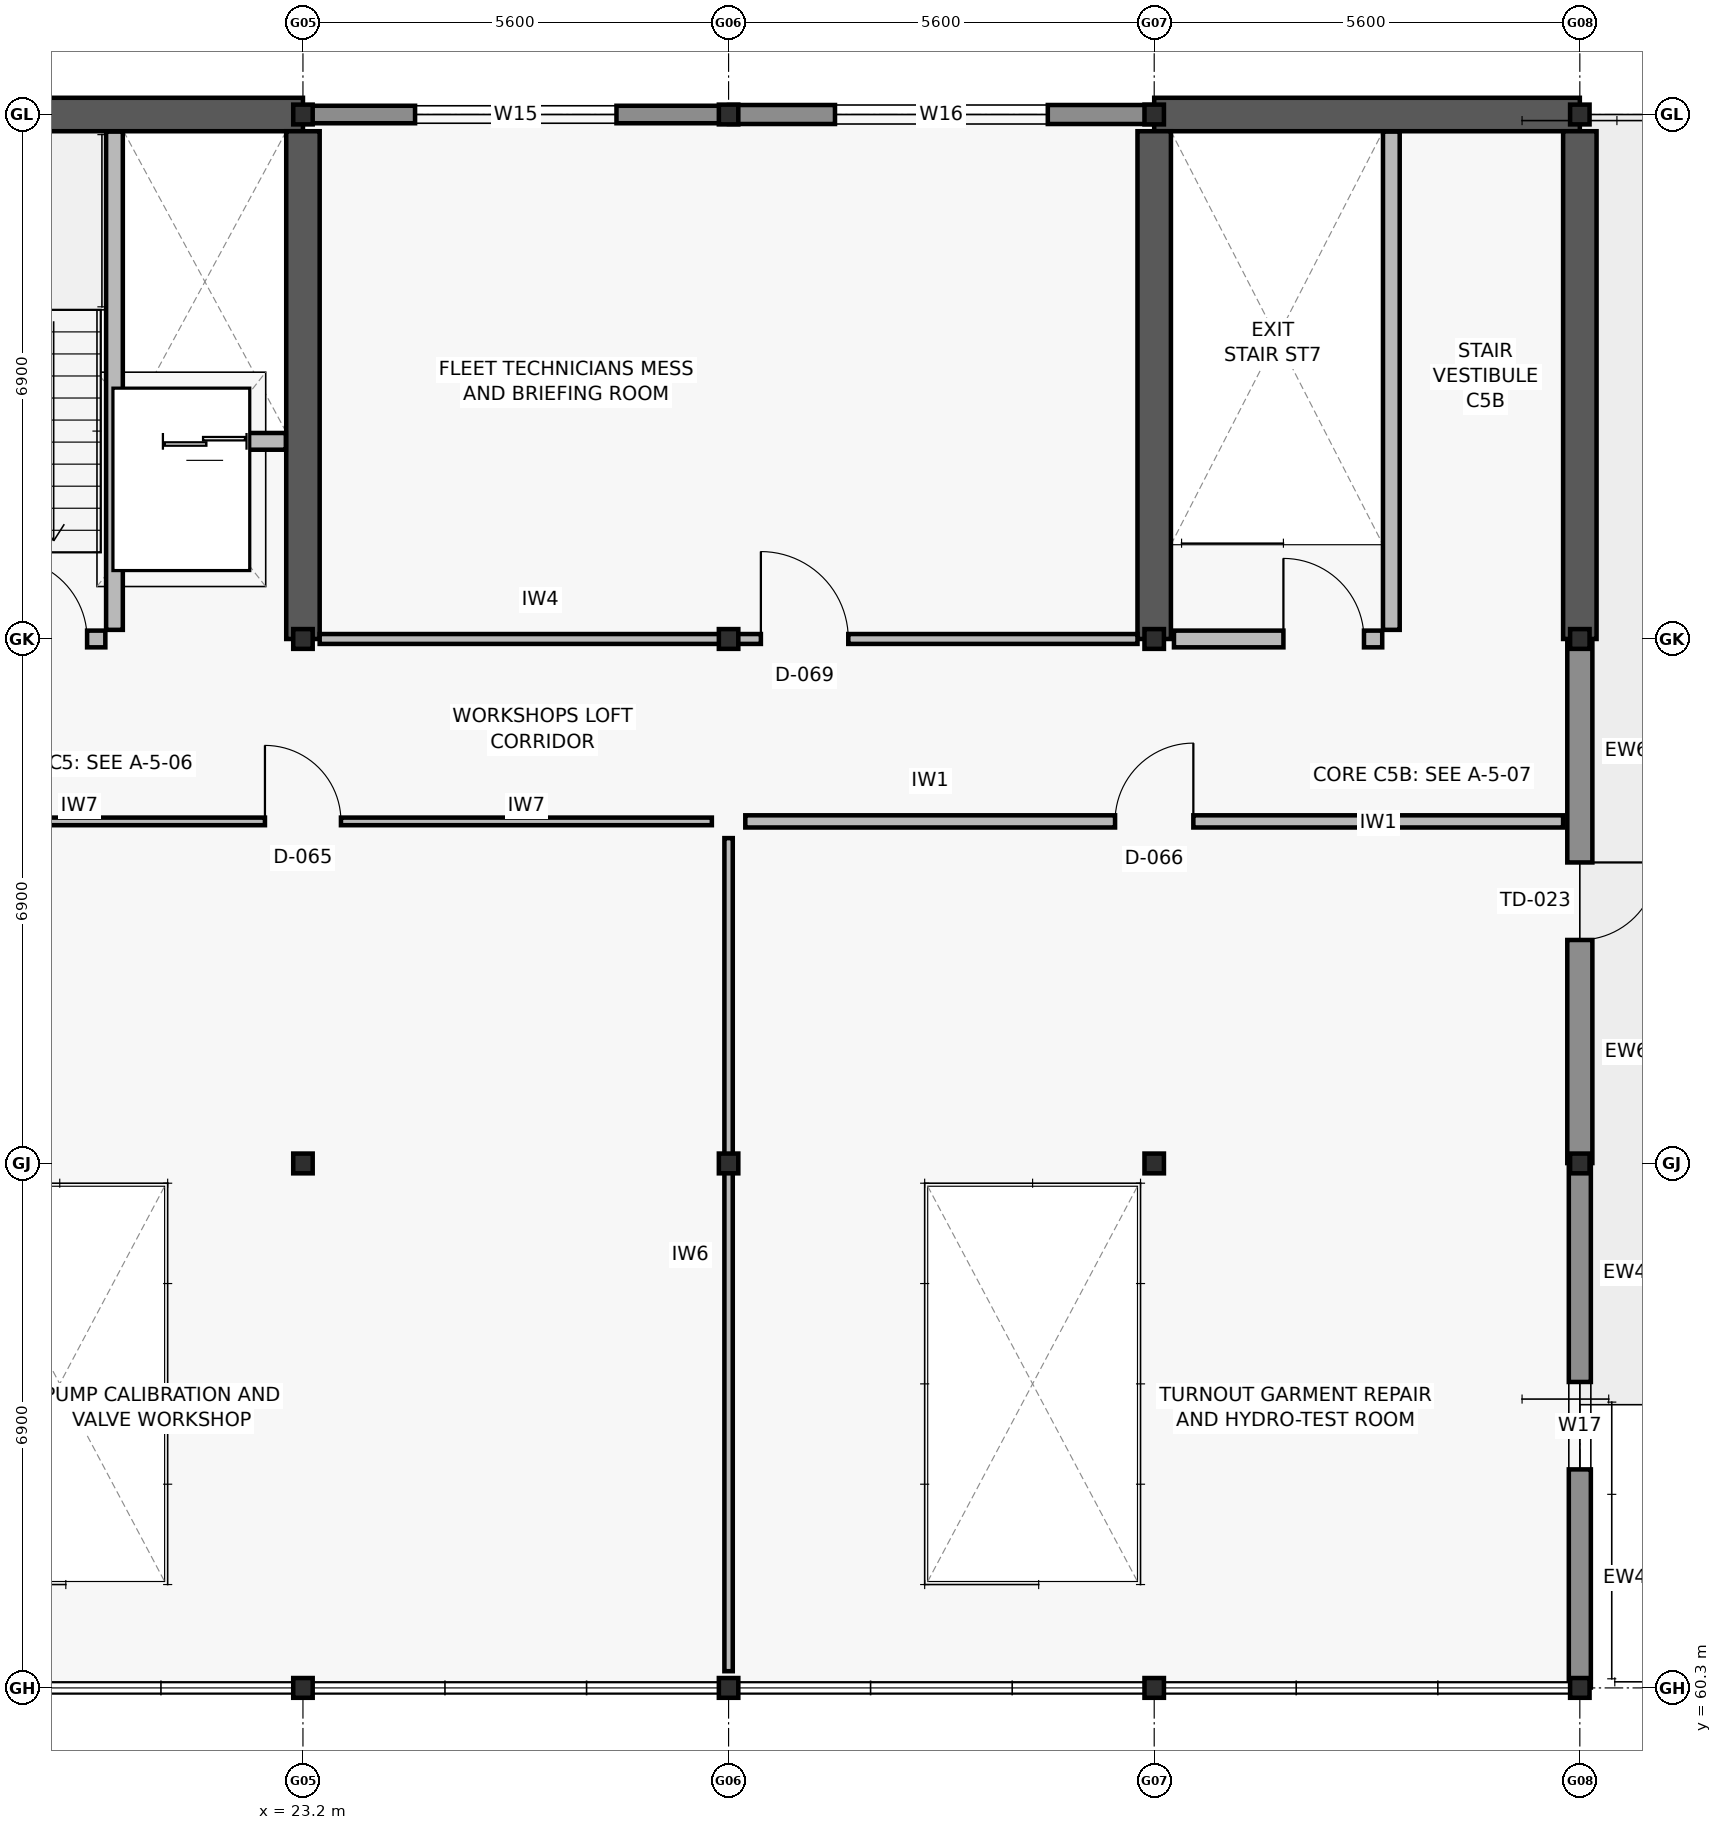
"""IFC4 building model, lengths in metres.
Left out: names, types, materials, properties, quantities, classifications, styles, units other than length and angle.
Written with IfcOpenShell. Run it as: python <this file> out.ifc"""

import sys

from ifc_helpers import new_model, si_unit, direction, frame, frame_2d, origin, origin_2d, place, context, subcontext, project, spatial, rectangle, i_section, extrude, element, fill, save


model = new_model("IFC4")
c1 = context("Model", 3, precision=1e-05, world=origin(), true_north=direction((0.0, 1.0)))
c2 = subcontext(c1, "Body", "Model", "MODEL_VIEW")
j1 = project(units=[si_unit("LENGTHUNIT", "METRE"), si_unit("PLANEANGLEUNIT", "RADIAN")], contexts=[c1])
p1 = place(None, origin())
s1 = spatial("IfcSite", under=j1, at=p1, CompositionType="ELEMENT")
p2 = place(p1, origin())
s2 = spatial("IfcBuilding", under=s1, at=p2, CompositionType="ELEMENT")
p3 = place(p2, frame((0.0, 0.0, 5.4)))
s3 = spatial("IfcBuildingStorey", under=s2, at=p3, CompositionType="ELEMENT", Elevation=5.4)
for number, where, z_axis, x_axis in (
    (1, (23.2, 60.3, 0.0), (0.0, 0.0, 1.0), (1.0, 0.0, 0.0)),
    (2, (23.2, 67.2, 0.0), (0.0, 0.0, 1.0), (1.0, 0.0, 0.0)),
    (3, (23.2, 74.1, 0.0), (0.0, 0.0, 1.0), (1.0, 0.0, 0.0)),
    (4, (23.2, 81.0, 0.0), (0.0, 0.0, 1.0), (1.0, 0.0, 0.0)),
    (5, (28.8, 60.3, 0.0), (0.0, 0.0, 1.0), (1.0, 0.0, 0.0)),
    (6, (28.8, 67.2, 0.0), (0.0, 0.0, 1.0), (1.0, 0.0, 0.0)),
    (7, (28.8, 74.1, 0.0), (0.0, 0.0, 1.0), (1.0, 0.0, 0.0)),
    (8, (28.8, 81.0, 0.0), (0.0, 0.0, 1.0), (1.0, 0.0, 0.0)),
    (9, (34.4, 60.3, 0.0), (0.0, 0.0, 1.0), (1.0, 0.0, 0.0)),
    (10, (34.4, 67.2, 0.0), (0.0, 0.0, 1.0), (1.0, 0.0, 0.0)),
    (11, (34.4, 74.1, 0.0), (0.0, 0.0, 1.0), (1.0, 0.0, 0.0)),
    (12, (34.4, 81.0, 0.0), (0.0, 0.0, 1.0), (1.0, 0.0, 0.0)),
    (13, (40.0, 60.3, 0.0), (0.0, 0.0, 1.0), (1.0, 0.0, 0.0)),
    (14, (40.0, 67.2, 0.0), (0.0, 0.0, 1.0), (1.0, 0.0, 0.0)),
    (15, (40.0, 74.1, 0.0), (0.0, 0.0, 1.0), (1.0, 0.0, 0.0)),
    (16, (40.0, 81.0, 0.0), (0.0, 0.0, 1.0), (1.0, 0.0, 0.0)),
):
    element("IfcColumn", number, at=place(p3, frame(where, z_axis=z_axis, x_axis=x_axis)), inside=s3, PredefinedType="COLUMN", context=c2, shape_type="SweptSolid", body=[
        extrude(i_section(OverallWidth=0.256, OverallDepth=0.26, WebThickness=0.01, FlangeThickness=0.017, FilletRadius=0.013, at=origin_2d()), origin(), (0.0, 0.0, 1.0), 4.2),
    ])
p4 = place(p3, frame((17.6, 81.0, 0.0), z_axis=(0.0, 0.0, 1.0), x_axis=(1.0, 0.0, 0.0)))
e17 = element("IfcWall", 17, at=p4, inside=s3, PredefinedType="SHEAR", context=c2, shape_type="SweptSolid", body=[
    extrude(rectangle(XDim=5.6, YDim=0.44, at=frame_2d((2.8, 0.0))), origin(), (0.0, 0.0, 1.0), 3.96),
])
p5 = place(p3, frame((23.2, 74.1, 0.0), z_axis=(0.0, 0.0, 1.0), x_axis=(0.0, 1.0, 0.0)))
e18 = element("IfcWall", 18, at=p5, inside=s3, PredefinedType="SHEAR", context=c2, shape_type="SweptSolid", body=[
    extrude(rectangle(XDim=6.68, YDim=0.44, at=frame_2d((3.34, 0.0))), origin(), (0.0, 0.0, 1.0), 3.96),
])
p6 = place(p3, frame((34.4, 81.0, 0.0), z_axis=(0.0, 0.0, 1.0), x_axis=(1.0, 0.0, 0.0)))
e19 = element("IfcWall", 19, at=p6, inside=s3, PredefinedType="SHEAR", context=c2, shape_type="SweptSolid", body=[
    extrude(rectangle(XDim=5.6, YDim=0.44, at=frame_2d((2.8, 0.0))), origin(), (0.0, 0.0, 1.0), 3.96),
])
for number, where, z_axis, x_axis in (
    (20, (34.4, 74.1, 0.0), (0.0, 0.0, 1.0), (0.0, 1.0, 0.0)),
    (21, (40.0, 74.1, 0.0), (0.0, 0.0, 1.0), (0.0, 1.0, 0.0)),
):
    element("IfcWall", number, at=place(p3, frame(where, z_axis=z_axis, x_axis=x_axis)), inside=s3, PredefinedType="SHEAR", context=c2, shape_type="SweptSolid", body=[
        extrude(rectangle(XDim=6.68, YDim=0.44, at=frame_2d((3.34, 0.0))), origin(), (0.0, 0.0, 1.0), 3.96),
    ])
p7 = place(p3, frame((23.205, 81.0, 0.0), z_axis=(0.0, 0.0, 1.0), x_axis=(1.0, 0.0, 0.0)))
e22 = element("IfcWall", 22, at=p7, inside=s3, PredefinedType="SOLIDWALL", context=c2, shape_type="SweptSolid", body=[
    extrude(rectangle(XDim=5.59, YDim=0.23, at=frame_2d((2.795, 0.0))), origin(), (0.0, 0.0, 1.0), 3.32),
])
p8 = place(p7, frame((1.47, 0.0, 0.8)))
e23 = element("IfcOpeningElement", 23, at=p8, cuts=e22, PredefinedType="OPENING", context=c2, shape_type="SweptSolid", body=[
    extrude(rectangle(XDim=2.65, YDim=1.8, at=frame_2d((1.325, 0.9))), frame((0.0, 0.125, 0.0), z_axis=(0.0, -1.0, 0.0), x_axis=(1.0, 0.0, 0.0)), (0.0, 0.0, 1.0), 0.25),
])
p9 = place(p3, frame((28.805, 81.0, 0.0), z_axis=(0.0, 0.0, 1.0), x_axis=(1.0, 0.0, 0.0)))
e24 = element("IfcWall", 24, at=p9, inside=s3, PredefinedType="SOLIDWALL", context=c2, shape_type="SweptSolid", body=[
    extrude(rectangle(XDim=5.59, YDim=0.25, at=frame_2d((2.795, 0.0))), origin(), (0.0, 0.0, 1.0), 3.32),
])
p10 = place(p9, frame((1.395, 0.0, 0.8)))
e25 = element("IfcOpeningElement", 25, at=p10, cuts=e24, PredefinedType="OPENING", context=c2, shape_type="SweptSolid", body=[
    extrude(rectangle(XDim=2.8, YDim=1.8, at=frame_2d((1.4, 0.9))), frame((0.0, 0.135, 0.0), z_axis=(0.0, -1.0, 0.0), x_axis=(1.0, 0.0, 0.0)), (0.0, 0.0, 1.0), 0.27),
])
p11 = place(p3, frame((40.0, 67.195, 0.0), z_axis=(0.0, 0.0, 1.0), x_axis=(0.0, -1.0, 0.0)))
e26 = element("IfcWall", 26, at=p11, inside=s3, PredefinedType="SOLIDWALL", context=c2, shape_type="SweptSolid", body=[
    extrude(rectangle(XDim=6.89, YDim=0.29, at=frame_2d((3.445, 0.0))), origin(), (0.0, 0.0, 1.0), 3.32),
])
p12 = place(p11, frame((2.87, 0.0, 0.8)))
e27 = element("IfcOpeningElement", 27, at=p12, cuts=e26, PredefinedType="OPENING", context=c2, shape_type="SweptSolid", body=[
    extrude(rectangle(XDim=1.15, YDim=1.8, at=frame_2d((0.575, 0.9))), frame((0.0, 0.155, 0.0), z_axis=(0.0, -1.0, 0.0), x_axis=(1.0, 0.0, 0.0)), (0.0, 0.0, 1.0), 0.31),
])
p13 = place(p3, frame((40.0, 74.095, 0.0), z_axis=(0.0, 0.0, 1.0), x_axis=(0.0, -1.0, 0.0)))
e28 = element("IfcWall", 28, at=p13, inside=s3, PredefinedType="SOLIDWALL", context=c2, shape_type="SweptSolid", body=[
    extrude(rectangle(XDim=6.89, YDim=0.33, at=frame_2d((3.445, 0.0))), origin(), (0.0, 0.0, 1.0), 3.32),
])
p14 = place(p13, frame((2.935, 0.0, 0.0)))
e29 = element("IfcOpeningElement", 29, at=p14, cuts=e28, PredefinedType="OPENING", context=c2, shape_type="SweptSolid", body=[
    extrude(rectangle(XDim=1.02, YDim=2.14, at=frame_2d((0.51, 1.07))), frame((0.0, 0.175, 0.0), z_axis=(0.0, -1.0, 0.0), x_axis=(1.0, 0.0, 0.0)), (0.0, 0.0, 1.0), 0.35),
])
p15 = place(p3, frame((20.72, 74.22, 0.0), z_axis=(0.0, 0.0, 1.0), x_axis=(0.0, 1.0, 0.0)))
e30 = element("IfcWall", 30, at=p15, inside=s3, PredefinedType="SOLIDWALL", context=c2, shape_type="SweptSolid", body=[
    extrude(rectangle(XDim=6.555, YDim=0.22, at=frame_2d((3.277, 0.0))), origin(), (0.0, 0.0, 1.0), 3.96),
])
p16 = place(p3, frame((17.86, 74.1, 0.0), z_axis=(0.0, 0.0, 1.0), x_axis=(1.0, 0.0, 0.0)))
e31 = element("IfcWall", 31, at=p16, inside=s3, PredefinedType="SOLIDWALL", context=c2, shape_type="SweptSolid", body=[
    extrude(rectangle(XDim=2.74, YDim=0.22, at=frame_2d((1.37, 0.0))), origin(), (0.0, 0.0, 1.0), 3.32),
])
p17 = place(p16, frame((1.44, 0.0, 0.0)))
e32 = element("IfcOpeningElement", 32, at=p17, cuts=e31, PredefinedType="OPENING", context=c2, shape_type="SweptSolid", body=[
    extrude(rectangle(XDim=1.06, YDim=2.1, at=frame_2d((0.53, 1.05))), frame((0.0, 0.12, 0.0), z_axis=(0.0, -1.0, 0.0), x_axis=(1.0, 0.0, 0.0)), (0.0, 0.0, 1.0), 0.24),
])
p18 = place(p3, frame((20.84, 76.7, 0.0), z_axis=(0.0, 0.0, 1.0), x_axis=(1.0, 0.0, 0.0)))
e33 = element("IfcWall", 33, at=p18, inside=s3, PredefinedType="SOLIDWALL", context=c2, shape_type="SweptSolid", body=[
    extrude(rectangle(XDim=2.135, YDim=0.22, at=frame_2d((1.067, 0.0))), origin(), (0.0, 0.0, 1.0), 3.96),
])
p19 = place(p18, frame((0.518, 0.0, 0.0)))
e34 = element("IfcOpeningElement", 34, at=p19, cuts=e33, PredefinedType="OPENING", context=c2, shape_type="SweptSolid", body=[
    extrude(rectangle(XDim=1.1, YDim=2.1, at=frame_2d((0.55, 1.05))), frame((0.0, 0.12, 0.0), z_axis=(0.0, -1.0, 0.0), x_axis=(1.0, 0.0, 0.0)), (0.0, 0.0, 1.0), 0.24),
])
p20 = place(p3, frame((37.52, 74.22, 0.0), z_axis=(0.0, 0.0, 1.0), x_axis=(0.0, 1.0, 0.0)))
e35 = element("IfcWall", 35, at=p20, inside=s3, PredefinedType="SOLIDWALL", context=c2, shape_type="SweptSolid", body=[
    extrude(rectangle(XDim=6.555, YDim=0.22, at=frame_2d((3.277, 0.0))), origin(), (0.0, 0.0, 1.0), 3.96),
])
p21 = place(p3, frame((34.66, 74.1, 0.0), z_axis=(0.0, 0.0, 1.0), x_axis=(1.0, 0.0, 0.0)))
e36 = element("IfcWall", 36, at=p21, inside=s3, PredefinedType="SOLIDWALL", context=c2, shape_type="SweptSolid", body=[
    extrude(rectangle(XDim=2.74, YDim=0.22, at=frame_2d((1.37, 0.0))), origin(), (0.0, 0.0, 1.0), 3.32),
])
p22 = place(p21, frame((1.44, 0.0, 0.0)))
e37 = element("IfcOpeningElement", 37, at=p22, cuts=e36, PredefinedType="OPENING", context=c2, shape_type="SweptSolid", body=[
    extrude(rectangle(XDim=1.06, YDim=2.1, at=frame_2d((0.53, 1.05))), frame((0.0, 0.12, 0.0), z_axis=(0.0, -1.0, 0.0), x_axis=(1.0, 0.0, 0.0)), (0.0, 0.0, 1.0), 0.24),
])
p23 = place(p3, frame((28.8, 60.52, 0.0), z_axis=(0.0, 0.0, 1.0), x_axis=(0.0, 1.0, 0.0)))
e38 = element("IfcWall", 38, at=p23, inside=s3, PredefinedType="PARTITIONING", context=c2, shape_type="SweptSolid", body=[
    extrude(rectangle(XDim=10.96, YDim=0.11, at=frame_2d((5.48, 0.0))), origin(), (0.0, 0.0, 1.0), 3.3),
])
p24 = place(p3, frame((17.82, 71.7, 0.0), z_axis=(0.0, 0.0, 1.0), x_axis=(1.0, 0.0, 0.0)))
e39 = element("IfcWall", 39, at=p24, inside=s3, PredefinedType="PARTITIONING", context=c2, shape_type="SweptSolid", body=[
    extrude(rectangle(XDim=10.76, YDim=0.1, at=frame_2d((5.38, 0.0))), origin(), (0.0, 0.0, 1.0), 3.3),
])
p25 = place(p24, frame((4.88, 0.0, 0.0)))
e40 = element("IfcOpeningElement", 40, at=p25, cuts=e39, PredefinedType="OPENING", context=c2, shape_type="SweptSolid", body=[
    extrude(rectangle(XDim=1.0, YDim=2.12, at=frame_2d((0.5, 1.06))), frame((0.0, 0.06, 0.0), z_axis=(0.0, -1.0, 0.0), x_axis=(1.0, 0.0, 0.0)), (0.0, 0.0, 1.0), 0.12),
])
p26 = place(p3, frame((29.02, 71.7, 0.0), z_axis=(0.0, 0.0, 1.0), x_axis=(1.0, 0.0, 0.0)))
e41 = element("IfcWall", 41, at=p26, inside=s3, PredefinedType="PARTITIONING", context=c2, shape_type="SweptSolid", body=[
    extrude(rectangle(XDim=10.76, YDim=0.16, at=frame_2d((5.38, 0.0))), origin(), (0.0, 0.0, 1.0), 3.3),
])
p27 = place(p26, frame((4.865, 0.0, 0.0)))
e42 = element("IfcOpeningElement", 42, at=p27, cuts=e41, PredefinedType="OPENING", context=c2, shape_type="SweptSolid", body=[
    extrude(rectangle(XDim=1.03, YDim=2.06, at=frame_2d((0.515, 1.03))), frame((0.0, 0.09, 0.0), z_axis=(0.0, -1.0, 0.0), x_axis=(1.0, 0.0, 0.0)), (0.0, 0.0, 1.0), 0.18),
])
p28 = place(p3, frame((23.42, 74.1, 0.0), z_axis=(0.0, 0.0, 1.0), x_axis=(1.0, 0.0, 0.0)))
e43 = element("IfcWall", 43, at=p28, inside=s3, PredefinedType="PARTITIONING", context=c2, shape_type="SweptSolid", body=[
    extrude(rectangle(XDim=10.76, YDim=0.13, at=frame_2d((5.38, 0.0))), origin(), (0.0, 0.0, 1.0), 3.3),
])
p29 = place(p28, frame((5.805, 0.0, 0.0)))
e44 = element("IfcOpeningElement", 44, at=p29, cuts=e43, PredefinedType="OPENING", context=c2, shape_type="SweptSolid", body=[
    extrude(rectangle(XDim=1.15, YDim=2.12, at=frame_2d((0.575, 1.06))), frame((0.0, 0.075, 0.0), z_axis=(0.0, -1.0, 0.0), x_axis=(1.0, 0.0, 0.0)), (0.0, 0.0, 1.0), 0.15),
])
p30 = place(p8, origin())
e45 = element("IfcWindow", 45, at=p30, inside=s3, PartitioningType="TRIPLE_PANEL_VERTICAL", PredefinedType="WINDOW", context=c2, shape_type="SweptSolid", body=[
    extrude(rectangle(XDim=2.65, YDim=1.8, at=frame_2d((1.325, 0.9))), frame((0.0, 0.03, 0.0), z_axis=(0.0, -1.0, 0.0), x_axis=(1.0, 0.0, 0.0)), (0.0, 0.0, 1.0), 0.06),
])
fill(e23, e45)
p31 = place(p10, origin())
e46 = element("IfcWindow", 46, at=p31, inside=s3, PartitioningType="TRIPLE_PANEL_VERTICAL", PredefinedType="WINDOW", context=c2, shape_type="SweptSolid", body=[
    extrude(rectangle(XDim=2.8, YDim=1.8, at=frame_2d((1.4, 0.9))), frame((0.0, 0.03, 0.0), z_axis=(0.0, -1.0, 0.0), x_axis=(1.0, 0.0, 0.0)), (0.0, 0.0, 1.0), 0.06),
])
fill(e25, e46)
p32 = place(p12, origin())
e47 = element("IfcWindow", 47, at=p32, inside=s3, PartitioningType="SINGLE_PANEL", PredefinedType="WINDOW", context=c2, shape_type="SweptSolid", body=[
    extrude(rectangle(XDim=1.15, YDim=1.8, at=frame_2d((0.575, 0.9))), frame((0.0, 0.03, 0.0), z_axis=(0.0, -1.0, 0.0), x_axis=(1.0, 0.0, 0.0)), (0.0, 0.0, 1.0), 0.06),
])
fill(e27, e47)
p33 = place(p14, origin())
e48 = element("IfcDoor", 48, at=p33, inside=s3, OperationType="SINGLE_SWING_LEFT", PredefinedType="DOOR", context=c2, shape_type="SweptSolid", body=[
    extrude(rectangle(XDim=1.02, YDim=2.14, at=frame_2d((0.51, 1.07))), frame((0.0, 0.025, 0.0), z_axis=(0.0, -1.0, 0.0), x_axis=(1.0, 0.0, 0.0)), (0.0, 0.0, 1.0), 0.05),
])
fill(e29, e48)
p34 = place(p17, origin())
e49 = element("IfcDoor", 49, at=p34, inside=s3, OperationType="SINGLE_SWING_LEFT", PredefinedType="DOOR", context=c2, shape_type="SweptSolid", body=[
    extrude(rectangle(XDim=1.06, YDim=2.1, at=frame_2d((0.53, 1.05))), frame((0.0, 0.025, 0.0), z_axis=(0.0, -1.0, 0.0), x_axis=(1.0, 0.0, 0.0)), (0.0, 0.0, 1.0), 0.05),
])
fill(e32, e49)
p35 = place(p19, origin())
e50 = element("IfcDoor", 50, at=p35, inside=s3, OperationType="DOUBLE_DOOR_SLIDING", PredefinedType="DOOR", context=c2, shape_type="SweptSolid", body=[
    extrude(rectangle(XDim=1.1, YDim=2.1, at=frame_2d((0.55, 1.05))), frame((0.0, 0.025, 0.0), z_axis=(0.0, -1.0, 0.0), x_axis=(1.0, 0.0, 0.0)), (0.0, 0.0, 1.0), 0.05),
])
fill(e34, e50)
p36 = place(p22, origin())
e51 = element("IfcDoor", 51, at=p36, inside=s3, OperationType="SINGLE_SWING_LEFT", PredefinedType="DOOR", context=c2, shape_type="SweptSolid", body=[
    extrude(rectangle(XDim=1.06, YDim=2.1, at=frame_2d((0.53, 1.05))), frame((0.0, 0.025, 0.0), z_axis=(0.0, -1.0, 0.0), x_axis=(1.0, 0.0, 0.0)), (0.0, 0.0, 1.0), 0.05),
])
fill(e37, e51)
p37 = place(p25, origin())
e52 = element("IfcDoor", 52, at=p37, inside=s3, OperationType="SINGLE_SWING_LEFT", PredefinedType="DOOR", context=c2, shape_type="SweptSolid", body=[
    extrude(rectangle(XDim=1.0, YDim=2.12, at=frame_2d((0.5, 1.06))), frame((0.0, 0.025, 0.0), z_axis=(0.0, -1.0, 0.0), x_axis=(1.0, 0.0, 0.0)), (0.0, 0.0, 1.0), 0.05),
])
fill(e40, e52)
p38 = place(p27, origin())
e53 = element("IfcDoor", 53, at=p38, inside=s3, OperationType="SINGLE_SWING_RIGHT", PredefinedType="DOOR", context=c2, shape_type="SweptSolid", body=[
    extrude(rectangle(XDim=1.03, YDim=2.06, at=frame_2d((0.515, 1.03))), frame((0.0, 0.025, 0.0), z_axis=(0.0, -1.0, 0.0), x_axis=(1.0, 0.0, 0.0)), (0.0, 0.0, 1.0), 0.05),
])
fill(e42, e53)
p39 = place(p29, origin())
e54 = element("IfcDoor", 54, at=p39, inside=s3, OperationType="SINGLE_SWING_LEFT", PredefinedType="DOOR", context=c2, shape_type="SweptSolid", body=[
    extrude(rectangle(XDim=1.15, YDim=2.12, at=frame_2d((0.575, 1.06))), frame((0.0, 0.025, 0.0), z_axis=(0.0, -1.0, 0.0), x_axis=(1.0, 0.0, 0.0)), (0.0, 0.0, 1.0), 0.05),
])
fill(e44, e54)
save(model, sys.argv[1])
